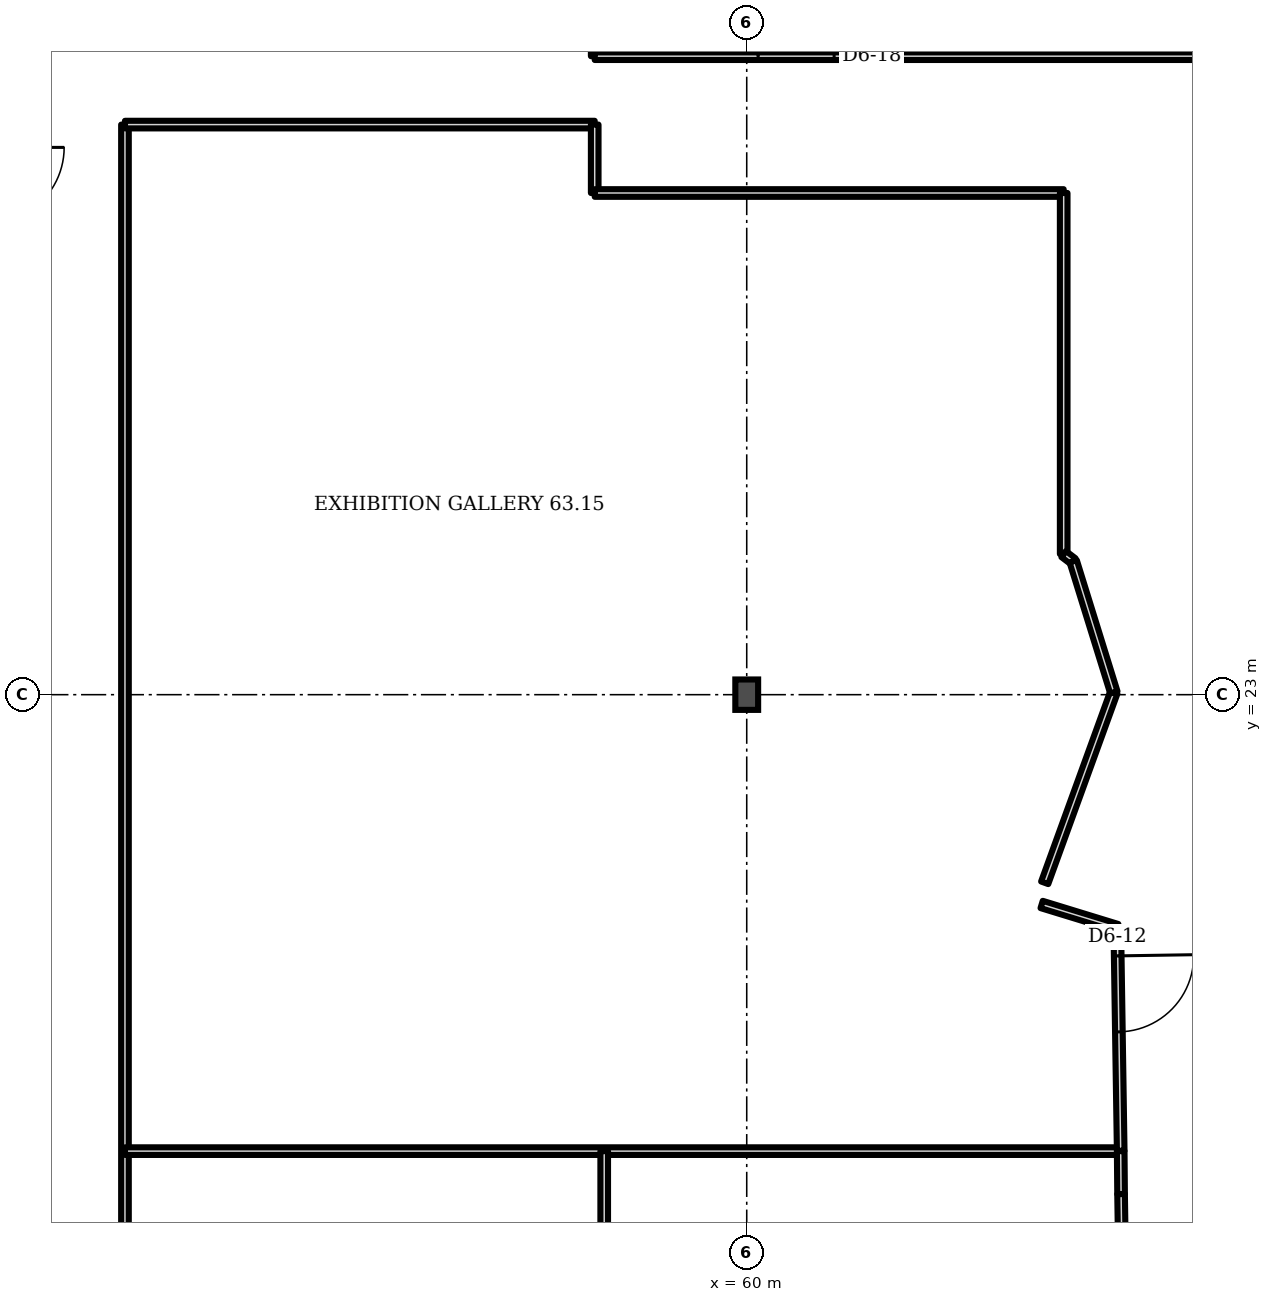
"""IFC4 building model, lengths in metres.
Left out: names, types, materials, properties, quantities, classifications, styles, units other than length and angle.
Written with IfcOpenShell. Run it as: python <this file> out.ifc"""

import sys

from ifc_helpers import new_model, si_unit, direction, frame, frame_2d, origin, origin_2d, place, context, subcontext, project, spatial, rectangle, i_section, extrude, element, fill, save


model = new_model("IFC4")
c1 = context("Model", 3, precision=1e-05, world=origin(), true_north=direction((0.0, 1.0)))
c2 = subcontext(c1, "Body", "Model", "MODEL_VIEW")
j1 = project(units=[si_unit("LENGTHUNIT", "METRE"), si_unit("PLANEANGLEUNIT", "RADIAN")], contexts=[c1])
p1 = place(None, origin())
s1 = spatial("IfcSite", under=j1, at=p1, CompositionType="ELEMENT")
p2 = place(p1, origin())
s2 = spatial("IfcBuilding", under=s1, at=p2, CompositionType="ELEMENT")
p3 = place(p2, frame((0.0, 0.0, 250.3)))
s3 = spatial("IfcBuildingStorey", under=s2, at=p3, CompositionType="ELEMENT", Elevation=250.3)
p4 = place(p3, frame((60.0, 23.0, 0.0), z_axis=(0.0, 0.0, 1.0), x_axis=(1.0, 0.0, 0.0)))
e1 = element("IfcColumn", 1, at=p4, inside=s3, PredefinedType="COLUMN", context=c2, shape_type="SweptSolid", body=[
    extrude(i_section(OverallWidth=0.3, OverallDepth=0.4, WebThickness=0.013, FlangeThickness=0.024, FilletRadius=0.027, at=origin_2d()), origin(), (0.0, 0.0, 1.0), 3.6),
])
p5 = place(p3, frame((51.82, 3.717, 0.0), z_axis=(0.0, 0.0, 1.0), x_axis=(0.0, 1.0, 0.0)))
e2 = element("IfcWall", 2, at=p5, inside=s3, PredefinedType="PARTITIONING", context=c2, shape_type="SweptSolid", body=[
    extrude(rectangle(XDim=26.783, YDim=0.1, at=frame_2d((13.391, 0.0))), origin(), (0.0, 0.0, 1.0), 2.58),
])
p6 = place(p5, frame((2.798, 0.0, 0.0)))
e3 = element("IfcOpeningElement", 3, at=p6, cuts=e2, PredefinedType="OPENING", context=c2, shape_type="SweptSolid", body=[
    extrude(rectangle(XDim=1.0, YDim=2.1, at=frame_2d((0.5, 1.05))), frame((0.0, 0.06, 0.0), z_axis=(0.0, -1.0, 0.0), x_axis=(1.0, 0.0, 0.0)), (0.0, 0.0, 1.0), 0.12),
])
p7 = place(p5, frame((9.453, 0.0, 0.0)))
e4 = element("IfcOpeningElement", 4, at=p7, cuts=e2, PredefinedType="OPENING", context=c2, shape_type="SweptSolid", body=[
    extrude(rectangle(XDim=1.0, YDim=2.1, at=frame_2d((0.5, 1.05))), frame((0.0, 0.06, 0.0), z_axis=(0.0, -1.0, 0.0), x_axis=(1.0, 0.0, 0.0)), (0.0, 0.0, 1.0), 0.12),
])
p8 = place(p3, frame((51.82, 16.995, 0.0), z_axis=(0.0, 0.0, 1.0), x_axis=(1.0, 0.0, 0.0)))
e5 = element("IfcWall", 5, at=p8, inside=s3, PredefinedType="PARTITIONING", context=c2, shape_type="SweptSolid", body=[
    extrude(rectangle(XDim=13.1, YDim=0.1, at=frame_2d((6.55, 0.0))), origin(), (0.0, 0.0, 1.0), 3.2),
])
p9 = place(p3, frame((51.82, 30.5, 0.0), z_axis=(0.0, 0.0, 1.0), x_axis=(1.0, 0.0, 0.0)))
e6 = element("IfcWall", 6, at=p9, inside=s3, PredefinedType="PARTITIONING", context=c2, shape_type="SweptSolid", body=[
    extrude(rectangle(XDim=6.18, YDim=0.1, at=frame_2d((3.09, 0.0))), origin(), (0.0, 0.0, 1.0), 3.2),
])
p10 = place(p3, frame((58.0, 29.6, 0.0), z_axis=(0.0, 0.0, 1.0), x_axis=(0.0, 1.0, 0.0)))
e7 = element("IfcWall", 7, at=p10, inside=s3, PredefinedType="PARTITIONING", context=c2, shape_type="SweptSolid", body=[
    extrude(rectangle(XDim=0.9, YDim=0.1, at=frame_2d((0.45, 0.0))), origin(), (0.0, 0.0, 1.0), 3.2),
])
p11 = place(p3, frame((58.0, 29.6, 0.0), z_axis=(0.0, 0.0, 1.0), x_axis=(1.0, 0.0, 0.0)))
e8 = element("IfcWall", 8, at=p11, inside=s3, PredefinedType="PARTITIONING", context=c2, shape_type="SweptSolid", body=[
    extrude(rectangle(XDim=6.17, YDim=0.1, at=frame_2d((3.085, 0.0))), origin(), (0.0, 0.0, 1.0), 3.2),
])
p12 = place(p3, frame((58.0, 31.4, 0.0), z_axis=(0.0, 0.0, 1.0), x_axis=(0.0, 1.0, 0.0)))
e9 = element("IfcWall", 9, at=p12, inside=s3, PredefinedType="PARTITIONING", context=c2, shape_type="SweptSolid", body=[
    extrude(rectangle(XDim=2.58, YDim=0.1, at=frame_2d((1.29, 0.0))), origin(), (0.0, 0.0, 1.0), 3.2),
])
p13 = place(p3, frame((58.0, 31.4, 0.0), z_axis=(0.0, 0.0, 1.0), x_axis=(1.0, 0.0, 0.0)))
e10 = element("IfcWall", 10, at=p13, inside=s3, PredefinedType="PARTITIONING", context=c2, shape_type="SweptSolid", body=[
    extrude(rectangle(XDim=7.97, YDim=0.1, at=frame_2d((3.985, 0.0))), origin(), (0.0, 0.0, 1.0), 3.2),
])
p14 = place(p13, frame((2.15, 0.0, 0.0)))
e11 = element("IfcOpeningElement", 11, at=p14, cuts=e10, PredefinedType="OPENING", context=c2, shape_type="SweptSolid", body=[
    extrude(rectangle(XDim=1.0, YDim=2.1, at=frame_2d((0.5, 1.05))), frame((0.0, 0.06, 0.0), z_axis=(0.0, -1.0, 0.0), x_axis=(1.0, 0.0, 0.0)), (0.0, 0.0, 1.0), 0.12),
])
p15 = place(p3, frame((58.125, 10.35, 0.0), z_axis=(0.0, 0.0, 1.0), x_axis=(0.0, 1.0, 0.0)))
e12 = element("IfcWall", 12, at=p15, inside=s3, PredefinedType="PARTITIONING", context=c2, shape_type="SweptSolid", body=[
    extrude(rectangle(XDim=6.645, YDim=0.1, at=frame_2d((3.323, 0.0))), origin(), (0.0, 0.0, 1.0), 3.2),
])
p16 = place(p3, frame((63.92, 20.525, 0.0), z_axis=(0.0, 0.0, 1.0), x_axis=(0.341478, 0.939889, 0.0)))
e13 = element("IfcWall", 13, at=p16, inside=s3, PredefinedType="PARTITIONING", context=c2, shape_type="SweptSolid", body=[
    extrude(rectangle(XDim=2.665, YDim=0.1, at=frame_2d((1.333, 0.0))), origin(), (0.0, 0.0, 1.0), 3.2),
])
p17 = place(p3, frame((64.17, 24.85, 0.0), z_axis=(0.0, 0.0, 1.0), x_axis=(0.0, 1.0, 0.0)))
e14 = element("IfcWall", 14, at=p17, inside=s3, PredefinedType="PARTITIONING", context=c2, shape_type="SweptSolid", body=[
    extrude(rectangle(XDim=4.75, YDim=0.1, at=frame_2d((2.375, 0.0))), origin(), (0.0, 0.0, 1.0), 3.2),
])
p18 = place(p3, frame((64.295, 24.755, 0.0), z_axis=(0.0, 0.0, 1.0), x_axis=(-0.795501, 0.605948, 0.0)))
e15 = element("IfcWall", 15, at=p18, inside=s3, PredefinedType="PARTITIONING", context=c2, shape_type="SweptSolid", body=[
    extrude(rectangle(XDim=0.157, YDim=0.1, at=frame_2d((0.079, 0.0))), origin(), (0.0, 0.0, 1.0), 3.2),
])
p19 = place(p3, frame((64.83, 23.03, 0.0), z_axis=(0.0, 0.0, 1.0), x_axis=(-0.296328, 0.95509, 0.0)))
e16 = element("IfcWall", 16, at=p19, inside=s3, PredefinedType="PARTITIONING", context=c2, shape_type="SweptSolid", body=[
    extrude(rectangle(XDim=1.806, YDim=0.1, at=frame_2d((0.903, 0.0))), origin(), (0.0, 0.0, 1.0), 3.2),
])
p20 = place(p3, frame((64.875, 19.935, 0.0), z_axis=(0.0, 0.0, 1.0), x_axis=(-0.956114, 0.29298, 0.0)))
e17 = element("IfcWall", 17, at=p20, inside=s3, PredefinedType="PARTITIONING", context=c2, shape_type="SweptSolid", body=[
    extrude(rectangle(XDim=1.041, YDim=0.1, at=frame_2d((0.521, 0.0))), origin(), (0.0, 0.0, 1.0), 3.2),
])
p21 = place(p3, frame((64.92, 17.0, 0.0), z_axis=(0.0, 0.0, 1.0), x_axis=(-0.015303, 0.999879, 0.0)))
e18 = element("IfcWall", 18, at=p21, inside=s3, PredefinedType="PARTITIONING", context=c2, shape_type="SweptSolid", body=[
    extrude(rectangle(XDim=2.935, YDim=0.1, at=frame_2d((1.468, 0.0))), origin(), (0.0, 0.0, 1.0), 3.2),
])
p22 = place(p21, frame((1.564, 0.0, 0.0)))
e19 = element("IfcOpeningElement", 19, at=p22, cuts=e18, PredefinedType="OPENING", context=c2, shape_type="SweptSolid", body=[
    extrude(rectangle(XDim=1.0, YDim=2.1, at=frame_2d((0.5, 1.05))), frame((0.0, 0.06, 0.0), z_axis=(0.0, -1.0, 0.0), x_axis=(1.0, 0.0, 0.0)), (0.0, 0.0, 1.0), 0.12),
])
p23 = place(p3, frame((64.925, 16.43, 0.0), z_axis=(0.0, 0.0, 1.0), x_axis=(-0.009071, 0.999963, 0.0)))
e20 = element("IfcWall", 20, at=p23, inside=s3, PredefinedType="PARTITIONING", context=c2, shape_type="SweptSolid", body=[
    extrude(rectangle(XDim=0.565, YDim=0.1, at=frame_2d((0.283, 0.0))), origin(), (0.0, 0.0, 1.0), 3.2),
])
p24 = place(p3, frame((64.935, 15.76, 0.0), z_axis=(0.0, 0.0, 1.0), x_axis=(-0.01494, 0.999887, 0.0)))
e21 = element("IfcWall", 21, at=p24, inside=s3, PredefinedType="PARTITIONING", context=c2, shape_type="SweptSolid", body=[
    extrude(rectangle(XDim=0.67, YDim=0.1, at=frame_2d((0.335, 0.0))), origin(), (0.0, 0.0, 1.0), 3.2),
])
p25 = place(p22, origin())
e22 = element("IfcDoor", 22, at=p25, inside=s3, OperationType="SINGLE_SWING_RIGHT", PredefinedType="DOOR", context=c2, shape_type="SweptSolid", body=[
    extrude(rectangle(XDim=1.0, YDim=2.1, at=frame_2d((0.5, 1.05))), frame((0.0, 0.025, 0.0), z_axis=(0.0, -1.0, 0.0), x_axis=(1.0, 0.0, 0.0)), (0.0, 0.0, 1.0), 0.05),
])
fill(e19, e22)
p26 = place(p14, origin())
e23 = element("IfcDoor", 23, at=p26, inside=s3, OperationType="SINGLE_SWING_LEFT", PredefinedType="DOOR", context=c2, shape_type="SweptSolid", body=[
    extrude(rectangle(XDim=1.0, YDim=2.1, at=frame_2d((0.5, 1.05))), frame((0.0, 0.025, 0.0), z_axis=(0.0, -1.0, 0.0), x_axis=(1.0, 0.0, 0.0)), (0.0, 0.0, 1.0), 0.05),
])
fill(e11, e23)
save(model, sys.argv[1])
